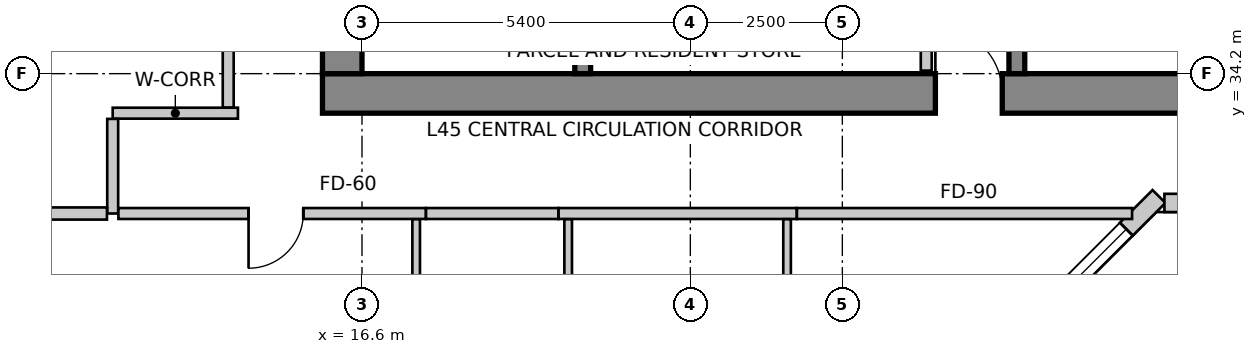
"""IFC4 building model, lengths in metres.
Left out: names, types, materials, properties, quantities, classifications, styles, units other than length and angle.
Written with IfcOpenShell. Run it as: python <this file> out.ifc"""

import sys

from ifc_helpers import new_model, si_unit, direction, frame, frame_2d, origin, place, context, subcontext, project, spatial, rectangle, extrude, source, transform, mapped, element, fill, save


model = new_model("IFC4")
c1 = context("Model", 3, precision=1e-05, world=origin(), true_north=direction((0.0, 1.0)))
c2 = subcontext(c1, "Body", "Model", "MODEL_VIEW")
j1 = project(units=[si_unit("LENGTHUNIT", "METRE"), si_unit("PLANEANGLEUNIT", "RADIAN")], contexts=[c1])
p1 = place(None, origin())
s1 = spatial("IfcSite", under=j1, at=p1, CompositionType="ELEMENT")
p2 = place(p1, origin())
s2 = spatial("IfcBuilding", under=s1, at=p2, CompositionType="ELEMENT")
p3 = place(p2, frame((0.0, 0.0, 183.4)))
s3 = spatial("IfcBuildingStorey", under=s2, at=p3, CompositionType="ELEMENT", Elevation=183.4)
p4 = place(p3, frame((15.95, 33.875, 0.0), z_axis=(0.0, 0.0, 1.0), x_axis=(1.0, 0.0, 0.0)))
e1 = element("IfcWall", 1, at=p4, inside=s3, PredefinedType="SHEAR", context=c2, shape_type="SweptSolid", body=[
    extrude(rectangle(XDim=15.7, YDim=0.65, at=frame_2d((7.85, 0.0))), origin(), (0.0, 0.0, 1.0), 3.5),
])
m1 = source(origin(), c2, "Body", "SweptSolid", [
    extrude(rectangle(XDim=1.1, YDim=2.15, at=frame_2d((0.55, 1.075))), frame((0.0, 0.335, 0.0), z_axis=(0.0, -1.0, 0.0), x_axis=(1.0, 0.0, 0.0)), (0.0, 0.0, 1.0), 0.67),
])
p5 = place(p4, frame((10.08, 0.0, 0.0)))
e2 = element("IfcOpeningElement", 2, at=p5, cuts=e1, PredefinedType="OPENING", context=c2, shape_type="MappedRepresentation", body=[
    mapped(m1, transform((0.0, 0.0, 0.0), scale=1.0)),
])
p6 = place(p3, frame((16.275, 34.2, 0.0), z_axis=(0.0, 0.0, 1.0), x_axis=(0.0, 1.0, 0.0)))
e3 = element("IfcWall", 3, at=p6, inside=s3, PredefinedType="SHEAR", context=c2, shape_type="SweptSolid", body=[
    extrude(rectangle(XDim=11.4, YDim=0.65, at=frame_2d((5.7, 0.0))), origin(), (0.0, 0.0, 1.0), 3.5),
])
p7 = place(p6, frame((7.15, 0.0, 0.0)))
e4 = element("IfcOpeningElement", 4, at=p7, cuts=e3, PredefinedType="OPENING", context=c2, shape_type="MappedRepresentation", body=[
    mapped(m1, transform((0.0, 0.0, 0.0), scale=1.0)),
])
p8 = place(p3, frame((20.23, 34.2, 0.0), z_axis=(0.0, 0.0, 1.0), x_axis=(0.0, 1.0, 0.0)))
e5 = element("IfcWall", 5, at=p8, inside=s3, PredefinedType="SHEAR", context=c2, shape_type="SweptSolid", body=[
    extrude(rectangle(XDim=9.06, YDim=0.26, at=frame_2d((4.53, 0.0))), origin(), (0.0, 0.0, 1.0), 3.5),
])
m2 = source(origin(), c2, "Body", "SweptSolid", [
    extrude(rectangle(XDim=1.1, YDim=2.15, at=frame_2d((0.55, 1.075))), frame((0.0, 0.14, 0.0), z_axis=(0.0, -1.0, 0.0), x_axis=(1.0, 0.0, 0.0)), (0.0, 0.0, 1.0), 0.28),
])
p9 = place(p8, frame((7.45, 0.0, 0.0)))
e6 = element("IfcOpeningElement", 6, at=p9, cuts=e5, PredefinedType="OPENING", context=c2, shape_type="MappedRepresentation", body=[
    mapped(m2, transform((0.0, 0.0, 0.0), scale=1.0)),
])
p10 = place(p3, frame((27.37, 34.2, 0.0), z_axis=(0.0, 0.0, 1.0), x_axis=(0.0, 1.0, 0.0)))
e7 = element("IfcWall", 7, at=p10, inside=s3, PredefinedType="SHEAR", context=c2, shape_type="SweptSolid", body=[
    extrude(rectangle(XDim=9.06, YDim=0.26, at=frame_2d((4.53, 0.0))), origin(), (0.0, 0.0, 1.0), 3.5),
])
p11 = place(p10, frame((7.45, 0.0, 0.0)))
e8 = element("IfcOpeningElement", 8, at=p11, cuts=e7, PredefinedType="OPENING", context=c2, shape_type="MappedRepresentation", body=[
    mapped(m2, transform((0.0, 0.0, 0.0), scale=1.0)),
])
p12 = place(p3, frame((27.652, 30.124, 0.0), z_axis=(0.0, 0.0, 1.0), x_axis=(0.707064797706, 0.707148762175, 0.0)))
e9 = element("IfcWall", 9, at=p12, inside=s3, PredefinedType="SOLIDWALL", context=c2, shape_type="SweptSolid", body=[
    extrude(rectangle(XDim=2.908, YDim=0.3, at=frame_2d((1.454, 0.0))), origin(), (0.0, 0.0, 1.0), 3.25),
])
m3 = source(origin(), c2, "Body", "SweptSolid", [
    extrude(rectangle(XDim=1.8, YDim=2.1, at=frame_2d((0.9, 1.05))), frame((0.0, 0.16, 0.0), z_axis=(0.0, -1.0, 0.0), x_axis=(1.0, 0.0, 0.0)), (0.0, 0.0, 1.0), 0.32),
])
p13 = place(p12, frame((0.348, 0.0, 0.85)))
e10 = element("IfcOpeningElement", 10, at=p13, cuts=e9, PredefinedType="OPENING", context=c2, shape_type="MappedRepresentation", body=[
    mapped(m3, transform((0.0, 0.0, 0.0), scale=1.0)),
])
p14 = place(p3, frame((29.797, 32.074, 0.0), z_axis=(0.0, 0.0, 1.0), x_axis=(1.0, 0.0, 0.0)))
e11 = element("IfcWall", 11, at=p14, inside=s3, PredefinedType="SOLIDWALL", context=c2, shape_type="SweptSolid", body=[
    extrude(rectangle(XDim=17.291, YDim=0.3, at=frame_2d((8.646, 0.0))), origin(), (0.0, 0.0, 1.0), 3.25),
])
m4 = source(origin(), c2, "Body", "SweptSolid", [
    extrude(rectangle(XDim=1.6, YDim=2.15, at=frame_2d((0.8, 1.075))), frame((0.0, 0.16, 0.0), z_axis=(0.0, -1.0, 0.0), x_axis=(1.0, 0.0, 0.0)), (0.0, 0.0, 1.0), 0.32),
])
p15 = place(p14, frame((4.053, 0.0, 0.0)))
e12 = element("IfcOpeningElement", 12, at=p15, cuts=e11, PredefinedType="OPENING", context=c2, shape_type="MappedRepresentation", body=[
    mapped(m4, transform((0.0, 0.0, 0.0), scale=1.0)),
])
m5 = source(origin(), c2, "Body", "SweptSolid", [
    extrude(rectangle(XDim=2.1, YDim=2.0, at=frame_2d((1.05, 1.0))), frame((0.0, 0.16, 0.0), z_axis=(0.0, -1.0, 0.0), x_axis=(1.0, 0.0, 0.0)), (0.0, 0.0, 1.0), 0.32),
])
p16 = place(p14, frame((0.676, 0.0, 0.85)))
e13 = element("IfcOpeningElement", 13, at=p16, cuts=e11, PredefinedType="OPENING", context=c2, shape_type="MappedRepresentation", body=[
    mapped(m5, transform((0.0, 0.0, 0.0), scale=1.0)),
])
p17 = place(p14, frame((8.661, 0.0, 0.85)))
e14 = element("IfcOpeningElement", 14, at=p17, cuts=e11, PredefinedType="OPENING", context=c2, shape_type="MappedRepresentation", body=[
    mapped(m5, transform((0.0, 0.0, 0.0), scale=1.0)),
])
p18 = place(p14, frame((14.205, 0.0, 0.85)))
e15 = element("IfcOpeningElement", 15, at=p18, cuts=e11, PredefinedType="OPENING", context=c2, shape_type="MappedRepresentation", body=[
    mapped(m5, transform((0.0, 0.0, 0.0), scale=1.0)),
])
p19 = place(p3, frame((13.269, 47.134, 0.0), z_axis=(0.0, 0.0, 1.0), x_axis=(-0.319920776449, -0.947444297464, 0.0)))
e16 = element("IfcWall", 16, at=p19, inside=s3, PredefinedType="SOLIDWALL", context=c2, shape_type="SweptSolid", body=[
    extrude(rectangle(XDim=16.133, YDim=0.3, at=frame_2d((8.067, 0.0))), origin(), (0.0, 0.0, 1.0), 3.25),
])
p20 = place(p19, frame((2.513, 0.0, 0.85)))
e17 = element("IfcOpeningElement", 17, at=p20, cuts=e16, PredefinedType="OPENING", context=c2, shape_type="MappedRepresentation", body=[
    mapped(m5, transform((0.0, 0.0, 0.0), scale=1.0)),
])
m6 = source(origin(), c2, "Body", "SweptSolid", [
    extrude(rectangle(XDim=2.4, YDim=2.2, at=frame_2d((1.2, 1.1))), frame((0.0, 0.16, 0.0), z_axis=(0.0, -1.0, 0.0), x_axis=(1.0, 0.0, 0.0)), (0.0, 0.0, 1.0), 0.32),
])
p21 = place(p19, frame((7.26, 0.0, 0.85)))
e18 = element("IfcOpeningElement", 18, at=p21, cuts=e16, PredefinedType="OPENING", context=c2, shape_type="MappedRepresentation", body=[
    mapped(m6, transform((0.0, 0.0, 0.0), scale=1.0)),
])
p22 = place(p19, frame((12.307, 0.0, 0.85)))
e19 = element("IfcOpeningElement", 19, at=p22, cuts=e16, PredefinedType="OPENING", context=c2, shape_type="MappedRepresentation", body=[
    mapped(m5, transform((0.0, 0.0, 0.0), scale=1.0)),
])
p23 = place(p3, frame((8.188, 31.834, 0.0), z_axis=(0.0, 0.0, 1.0), x_axis=(0.202303475707, -0.979322880217, 0.0)))
e20 = element("IfcWall", 20, at=p23, inside=s3, PredefinedType="SOLIDWALL", context=c2, shape_type="SweptSolid", body=[
    extrude(rectangle(XDim=15.766, YDim=0.3, at=frame_2d((7.883, 0.0))), origin(), (0.0, 0.0, 1.0), 3.25),
])
p24 = place(p23, frame((1.404, 0.0, 0.85)))
e21 = element("IfcOpeningElement", 21, at=p24, cuts=e20, PredefinedType="OPENING", context=c2, shape_type="MappedRepresentation", body=[
    mapped(m6, transform((0.0, 0.0, 0.0), scale=1.0)),
])
p25 = place(p23, frame((6.121, 0.0, 0.85)))
e22 = element("IfcOpeningElement", 22, at=p25, cuts=e20, PredefinedType="OPENING", context=c2, shape_type="MappedRepresentation", body=[
    mapped(m5, transform((0.0, 0.0, 0.0), scale=1.0)),
])
p26 = place(p23, frame((11.47, 0.0, 0.85)))
e23 = element("IfcOpeningElement", 23, at=p26, cuts=e20, PredefinedType="OPENING", context=c2, shape_type="MappedRepresentation", body=[
    mapped(m6, transform((0.0, 0.0, 0.0), scale=1.0)),
])
p27 = place(p3, frame((25.88, 35.956, 0.0), z_axis=(0.0, 0.0, 1.0), x_axis=(0.0, -1.0, 0.0)))
e24 = element("IfcWall", 24, at=p27, inside=s3, PredefinedType="PARTITIONING", context=c2, shape_type="SweptSolid", body=[
    extrude(rectangle(XDim=1.706, YDim=0.18, at=frame_2d((0.853, 0.0))), origin(), (0.0, 0.0, 1.0), 2.542),
])
p28 = place(p3, frame((12.5, 33.55, 0.0), z_axis=(0.0, 0.0, 1.0), x_axis=(1.0, 0.0, 0.0)))
e25 = element("IfcWall", 25, at=p28, inside=s3, PredefinedType="PARTITIONING", context=c2, shape_type="SweptSolid", body=[
    extrude(rectangle(XDim=2.06, YDim=0.18, at=frame_2d((1.03, 0.0))), origin(), (0.0, 0.0, 1.0), 3.25),
])
p29 = place(p3, frame((12.5, 31.9, 0.0), z_axis=(0.0, 0.0, 1.0), x_axis=(0.0, 1.0, 0.0)))
e26 = element("IfcWall", 26, at=p29, inside=s3, PredefinedType="PARTITIONING", context=c2, shape_type="SweptSolid", body=[
    extrude(rectangle(XDim=1.556, YDim=0.18, at=frame_2d((0.778, 0.0))), origin(), (0.0, 0.0, 1.0), 2.835),
])
p30 = place(p3, frame((23.751, 31.9, 0.0), z_axis=(0.0, 0.0, 1.0), x_axis=(-1.0, 0.0, 0.0)))
e27 = element("IfcWall", 27, at=p30, inside=s3, PredefinedType="PARTITIONING", context=c2, shape_type="SweptSolid", body=[
    extrude(rectangle(XDim=3.92, YDim=0.18, at=frame_2d((1.96, 0.0))), origin(), (0.0, 0.0, 1.0), 2.835),
])
p31 = place(p3, frame((29.265, 31.9, 0.0), z_axis=(0.0, 0.0, 1.0), x_axis=(-1.0, 0.0, 0.0)))
e28 = element("IfcWall", 28, at=p31, inside=s3, PredefinedType="PARTITIONING", context=c2, shape_type="SweptSolid", body=[
    extrude(rectangle(XDim=5.512, YDim=0.18, at=frame_2d((2.756, 0.0))), origin(), (0.0, 0.0, 1.0), 3.25),
])
p32 = place(p3, frame((17.651, 31.9, 0.0), z_axis=(0.0, 0.0, 1.0), x_axis=(-1.0, 0.0, 0.0)))
e29 = element("IfcWall", 29, at=p32, inside=s3, PredefinedType="PARTITIONING", context=c2, shape_type="SweptSolid", body=[
    extrude(rectangle(XDim=5.057, YDim=0.18, at=frame_2d((2.528, 0.0))), origin(), (0.0, 0.0, 1.0), 2.835),
])
m7 = source(origin(), c2, "Body", "SweptSolid", [
    extrude(rectangle(XDim=0.9, YDim=2.15, at=frame_2d((0.45, 1.075))), frame((0.0, 0.1, 0.0), z_axis=(0.0, -1.0, 0.0), x_axis=(1.0, 0.0, 0.0)), (0.0, 0.0, 1.0), 0.2),
])
p33 = place(p32, frame((2.017, 0.0, 0.0)))
e30 = element("IfcOpeningElement", 30, at=p33, cuts=e29, PredefinedType="OPENING", context=c2, shape_type="MappedRepresentation", body=[
    mapped(m7, transform((0.0, 0.0, 0.0), scale=1.0)),
])
p34 = place(p3, frame((19.829, 31.9, 0.0), z_axis=(0.0, 0.0, 1.0), x_axis=(-1.0, 0.0, 0.0)))
e31 = element("IfcWall", 31, at=p34, inside=s3, PredefinedType="PARTITIONING", context=c2, shape_type="SweptSolid", body=[
    extrude(rectangle(XDim=2.176, YDim=0.18, at=frame_2d((1.088, 0.0))), origin(), (0.0, 0.0, 1.0), 3.25),
])
p35 = place(p3, frame((14.4, 33.644, 0.0), z_axis=(0.0, 0.0, 1.0), x_axis=(0.0, 1.0, 0.0)))
e32 = element("IfcWall", 32, at=p35, inside=s3, PredefinedType="PARTITIONING", context=c2, shape_type="SweptSolid", body=[
    extrude(rectangle(XDim=12.606, YDim=0.18, at=frame_2d((6.303, 0.0))), origin(), (0.0, 0.0, 1.0), 3.25),
])
p36 = place(p35, frame((4.399, 0.0, 0.0)))
e33 = element("IfcOpeningElement", 33, at=p36, cuts=e32, PredefinedType="OPENING", context=c2, shape_type="MappedRepresentation", body=[
    mapped(m7, transform((0.0, 0.0, 0.0), scale=1.0)),
])
p37 = place(p3, frame((12.406, 31.9, 0.0), z_axis=(0.0, 0.0, 1.0), x_axis=(-1.0, 0.0, 0.0)))
e34 = element("IfcWall", 34, at=p37, inside=s3, PredefinedType="PARTITIONING", context=c2, shape_type="SweptSolid", body=[
    extrude(rectangle(XDim=4.115, YDim=0.2, at=frame_2d((2.057, 0.0))), origin(), (0.0, 0.0, 1.0), 2.542),
])
p38 = place(p3, frame((23.591, 31.806, 0.0), z_axis=(0.0, 0.0, 1.0), x_axis=(0.0, -1.0, 0.0)))
e35 = element("IfcWall", 35, at=p38, inside=s3, PredefinedType="PARTITIONING", context=c2, shape_type="SweptSolid", body=[
    extrude(rectangle(XDim=9.423, YDim=0.125, at=frame_2d((4.711, 0.0))), origin(), (0.0, 0.0, 1.0), 2.542),
])
m8 = source(origin(), c2, "Body", "SweptSolid", [
    extrude(rectangle(XDim=0.9, YDim=2.15, at=frame_2d((0.45, 1.075))), frame((0.0, 0.073, 0.0), z_axis=(0.0, -1.0, 0.0), x_axis=(1.0, 0.0, 0.0)), (0.0, 0.0, 1.0), 0.145),
])
p39 = place(p38, frame((5.106, 0.0, 0.0)))
e36 = element("IfcOpeningElement", 36, at=p39, cuts=e35, PredefinedType="OPENING", context=c2, shape_type="MappedRepresentation", body=[
    mapped(m8, transform((0.0, 0.0, 0.0), scale=1.0)),
])
p40 = place(p3, frame((19.991, 22.383, 0.0), z_axis=(0.0, 0.0, 1.0), x_axis=(0.0, 1.0, 0.0)))
e37 = element("IfcWall", 37, at=p40, inside=s3, PredefinedType="PARTITIONING", context=c2, shape_type="SweptSolid", body=[
    extrude(rectangle(XDim=9.423, YDim=0.125, at=frame_2d((4.711, 0.0))), origin(), (0.0, 0.0, 1.0), 2.688),
])
p41 = place(p40, frame((4.261, 0.0, 0.0)))
e38 = element("IfcOpeningElement", 38, at=p41, cuts=e37, PredefinedType="OPENING", context=c2, shape_type="MappedRepresentation", body=[
    mapped(m8, transform((0.0, 0.0, 0.0), scale=1.0)),
])
p42 = place(p3, frame((17.491, 31.806, 0.0), z_axis=(0.0, 0.0, 1.0), x_axis=(0.0, -1.0, 0.0)))
e39 = element("IfcWall", 39, at=p42, inside=s3, PredefinedType="PARTITIONING", context=c2, shape_type="SweptSolid", body=[
    extrude(rectangle(XDim=9.423, YDim=0.125, at=frame_2d((4.711, 0.0))), origin(), (0.0, 0.0, 1.0), 2.688),
])
m9 = source(origin(), c2, "Body", "SweptSolid", [
    extrude(rectangle(XDim=0.85, YDim=2.15, at=frame_2d((0.425, 1.075))), frame((0.0, 0.073, 0.0), z_axis=(0.0, -1.0, 0.0), x_axis=(1.0, 0.0, 0.0)), (0.0, 0.0, 1.0), 0.145),
])
p43 = place(p42, frame((4.287, 0.0, 0.0)))
e40 = element("IfcOpeningElement", 40, at=p43, cuts=e39, PredefinedType="OPENING", context=c2, shape_type="MappedRepresentation", body=[
    mapped(m9, transform((0.0, 0.0, 0.0), scale=1.0)),
])
m10 = source(origin(), c2, "Body", "SweptSolid", [
    extrude(rectangle(XDim=1.8, YDim=2.1, at=frame_2d((0.9, 1.05))), frame((0.0, -0.015, 0.0), z_axis=(0.0, -1.0, 0.0), x_axis=(1.0, 0.0, 0.0)), (0.0, 0.0, 1.0), 0.06),
])
p44 = place(p13, origin())
e41 = element("IfcWindow", 41, at=p44, inside=s3, PartitioningType="SINGLE_PANEL", PredefinedType="WINDOW", context=c2, shape_type="MappedRepresentation", body=[
    mapped(m10, transform((0.0, 0.0, 0.0), scale=1.0)),
])
fill(e10, e41)
m11 = source(origin(), c2, "Body", "SweptSolid", [
    extrude(rectangle(XDim=1.1, YDim=2.15, at=frame_2d((0.55, 1.075))), frame((0.0, 0.025, 0.0), z_axis=(0.0, -1.0, 0.0), x_axis=(1.0, 0.0, 0.0)), (0.0, 0.0, 1.0), 0.05),
])
p45 = place(p5, origin())
e42 = element("IfcDoor", 42, at=p45, inside=s3, OperationType="SINGLE_SWING_LEFT", PredefinedType="DOOR", context=c2, shape_type="MappedRepresentation", body=[
    mapped(m11, transform((0.0, 0.0, 0.0), scale=1.0)),
])
fill(e2, e42)
m12 = source(origin(), c2, "Body", "SweptSolid", [
    extrude(rectangle(XDim=0.9, YDim=2.15, at=frame_2d((0.45, 1.075))), frame((0.0, 0.025, 0.0), z_axis=(0.0, -1.0, 0.0), x_axis=(1.0, 0.0, 0.0)), (0.0, 0.0, 1.0), 0.05),
])
p46 = place(p33, origin())
e43 = element("IfcDoor", 43, at=p46, inside=s3, OperationType="SINGLE_SWING_RIGHT", PredefinedType="DOOR", context=c2, shape_type="MappedRepresentation", body=[
    mapped(m12, transform((0.0, 0.0, 0.0), scale=1.0)),
])
fill(e30, e43)
save(model, sys.argv[1])
